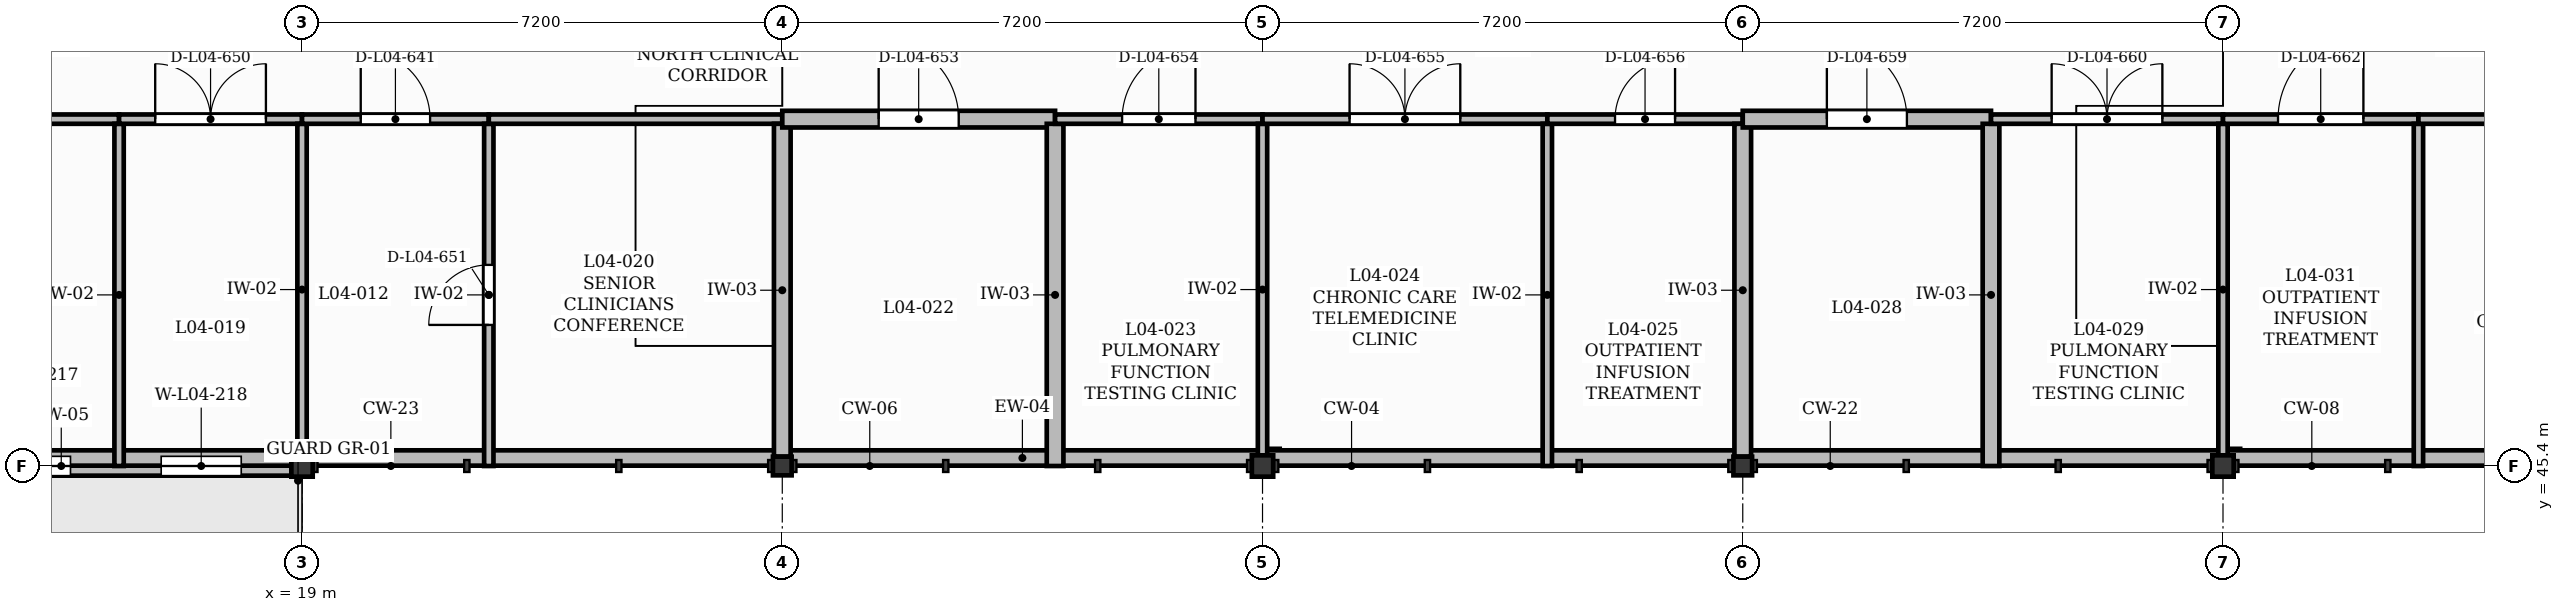
"""IFC4 building model, lengths in metres.
Left out: names, types, materials, properties, quantities, classifications, styles, units other than length and angle.
Written with IfcOpenShell. Run it as: python <this file> out.ifc"""

import sys

from ifc_helpers import new_model, si_unit, direction, frame, frame_2d, origin, origin_2d, place, context, subcontext, project, spatial, polyline, rectangle, outline, extrude, element, fill, save


model = new_model("IFC4")
c1 = context("Model", 3, precision=1e-05, world=origin(), true_north=direction((0.0, 1.0)))
c2 = subcontext(c1, "Body", "Model", "MODEL_VIEW")
j1 = project(units=[si_unit("LENGTHUNIT", "METRE"), si_unit("PLANEANGLEUNIT", "RADIAN")], contexts=[c1])
p1 = place(None, origin())
s1 = spatial("IfcSite", under=j1, at=p1, CompositionType="ELEMENT")
p2 = place(p1, origin())
s2 = spatial("IfcBuilding", under=s1, at=p2, CompositionType="ELEMENT")
p3 = place(p2, frame((0.0, 0.0, 17.4)))
s3 = spatial("IfcBuildingStorey", under=s2, at=p3, CompositionType="ELEMENT", Elevation=17.4)
p4 = place(p3, frame((19.0, 45.4, 0.0), z_axis=(0.0, 0.0, 1.0), x_axis=(1.0, 0.0, 0.0)))
e1 = element("IfcColumn", 1, at=p4, inside=s3, PredefinedType="COLUMN", context=c2, shape_type="SweptSolid", body=[
    extrude(rectangle(XDim=0.32, YDim=0.32, at=origin_2d()), origin(), (0.0, 0.0, 1.0), 3.95),
])
p5 = place(p3, frame((26.2, 45.4, 0.0), z_axis=(0.0, 0.0, 1.0), x_axis=(1.0, 0.0, 0.0)))
e2 = element("IfcColumn", 2, at=p5, inside=s3, PredefinedType="COLUMN", context=c2, shape_type="SweptSolid", body=[
    extrude(rectangle(XDim=0.28, YDim=0.28, at=origin_2d()), origin(), (0.0, 0.0, 1.0), 3.95),
])
p6 = place(p3, frame((33.4, 45.4, 0.0), z_axis=(0.0, 0.0, 1.0), x_axis=(1.0, 0.0, 0.0)))
e3 = element("IfcColumn", 3, at=p6, inside=s3, PredefinedType="COLUMN", context=c2, shape_type="SweptSolid", body=[
    extrude(rectangle(XDim=0.32, YDim=0.32, at=origin_2d()), origin(), (0.0, 0.0, 1.0), 3.95),
])
p7 = place(p3, frame((40.6, 45.4, 0.0), z_axis=(0.0, 0.0, 1.0), x_axis=(1.0, 0.0, 0.0)))
e4 = element("IfcColumn", 4, at=p7, inside=s3, PredefinedType="COLUMN", context=c2, shape_type="SweptSolid", body=[
    extrude(rectangle(XDim=0.28, YDim=0.28, at=origin_2d()), origin(), (0.0, 0.0, 1.0), 3.95),
])
p8 = place(p3, frame((47.8, 45.4, 0.0), z_axis=(0.0, 0.0, 1.0), x_axis=(1.0, 0.0, 0.0)))
e5 = element("IfcColumn", 5, at=p8, inside=s3, PredefinedType="COLUMN", context=c2, shape_type="SweptSolid", body=[
    extrude(rectangle(XDim=0.32, YDim=0.32, at=origin_2d()), origin(), (0.0, 0.0, 1.0), 3.95),
])
p9 = place(p3, frame((11.94, 45.4, 0.0), z_axis=(0.0, 0.0, 1.0), x_axis=(1.0, 0.0, 0.0)))
e6 = element("IfcWall", 6, at=p9, inside=s3, PredefinedType="SOLIDWALL", context=c2, shape_type="SweptSolid", body=[
    extrude(rectangle(XDim=6.9, YDim=0.29, at=frame_2d((3.45, 0.0))), origin(), (0.0, 0.0, 1.0), 3.49),
])
p10 = place(p9, frame((0.55, 0.0, 0.0)))
e7 = element("IfcOpeningElement", 7, at=p10, cuts=e6, PredefinedType="OPENING", context=c2, shape_type="SweptSolid", body=[
    extrude(rectangle(XDim=1.1, YDim=2.25, at=frame_2d((0.55, 1.125))), frame((0.0, 0.155, 0.0), z_axis=(0.0, -1.0, 0.0), x_axis=(1.0, 0.0, 0.0)), (0.0, 0.0, 1.0), 0.31),
])
p11 = place(p9, frame((2.438, 0.0, 1.5)))
e8 = element("IfcOpeningElement", 8, at=p11, cuts=e6, PredefinedType="OPENING", context=c2, shape_type="SweptSolid", body=[
    extrude(rectangle(XDim=1.15, YDim=1.25, at=frame_2d((0.575, 0.625))), frame((0.0, 0.155, 0.0), z_axis=(0.0, -1.0, 0.0), x_axis=(1.0, 0.0, 0.0)), (0.0, 0.0, 1.0), 0.31),
])
p12 = place(p9, frame((4.948, 0.0, 1.0)))
e9 = element("IfcOpeningElement", 9, at=p12, cuts=e6, PredefinedType="OPENING", context=c2, shape_type="SweptSolid", body=[
    extrude(rectangle(XDim=1.2, YDim=1.95, at=frame_2d((0.6, 0.975))), frame((0.0, 0.155, 0.0), z_axis=(0.0, -1.0, 0.0), x_axis=(1.0, 0.0, 0.0)), (0.0, 0.0, 1.0), 0.31),
])
p13 = place(p3, frame((4.6, 45.52, 4.2), z_axis=(0.0, 0.0, 1.0), x_axis=(1.0, 0.0, 0.0)))
e10 = element("IfcWall", 10, at=p13, inside=s3, PredefinedType="PARAPET", context=c2, shape_type="SweptSolid", body=[
    extrude(outline(polyline([(0.0, 0.0), (50.4, 0.0), (50.4, 0.6), (39.312, 0.85), (39.312, 0.6), (32.256, 1.1), (32.256, 0.85), (18.144, 1.1), (18.144, 0.85), (11.088, 0.85), (11.088, 0.6), (0.0, 0.6), (0.0, 0.0)])), frame((0.0, 0.115, 0.0), z_axis=(0.0, -1.0, 0.0), x_axis=(1.0, 0.0, 0.0)), (0.0, 0.0, 1.0), 0.23),
])
p14 = place(p3, frame((11.8, 50.6, 0.0), z_axis=(0.0, 0.0, 1.0), x_axis=(1.0, 0.0, 0.0)))
e11 = element("IfcWall", 11, at=p14, inside=s3, PredefinedType="PARTITIONING", context=c2, shape_type="SweptSolid", body=[
    extrude(rectangle(XDim=4.457, YDim=0.14, at=frame_2d((2.229, 0.0))), origin(), (0.0, 0.0, 1.0), 3.93),
])
p15 = place(p14, frame((1.678, 0.0, 0.0)))
e12 = element("IfcOpeningElement", 12, at=p15, cuts=e11, PredefinedType="OPENING", context=c2, shape_type="SweptSolid", body=[
    extrude(rectangle(XDim=1.1, YDim=2.1, at=frame_2d((0.55, 1.05))), frame((0.0, 0.08, 0.0), z_axis=(0.0, -1.0, 0.0), x_axis=(1.0, 0.0, 0.0)), (0.0, 0.0, 1.0), 0.16),
])
p16 = place(p3, frame((16.257, 45.4, 0.0), z_axis=(0.0, 0.0, 1.0), x_axis=(0.0, 1.0, 0.0)))
e13 = element("IfcWall", 13, at=p16, inside=s3, PredefinedType="PARTITIONING", context=c2, shape_type="SweptSolid", body=[
    extrude(rectangle(XDim=5.13, YDim=0.14, at=frame_2d((2.565, 0.0))), origin(), (0.0, 0.0, 1.0), 3.93),
])
p17 = place(p3, frame((16.257, 50.6, 0.0), z_axis=(0.0, 0.0, 1.0), x_axis=(1.0, 0.0, 0.0)))
e14 = element("IfcWall", 14, at=p17, inside=s3, PredefinedType="PARTITIONING", context=c2, shape_type="SweptSolid", body=[
    extrude(rectangle(XDim=2.743, YDim=0.14, at=frame_2d((1.372, 0.0))), origin(), (0.0, 0.0, 1.0), 3.93),
])
p18 = place(p17, frame((0.542, 0.0, 0.0)))
e15 = element("IfcOpeningElement", 15, at=p18, cuts=e14, PredefinedType="OPENING", context=c2, shape_type="SweptSolid", body=[
    extrude(rectangle(XDim=1.66, YDim=2.3, at=frame_2d((0.83, 1.15))), frame((0.0, 0.08, 0.0), z_axis=(0.0, -1.0, 0.0), x_axis=(1.0, 0.0, 0.0)), (0.0, 0.0, 1.0), 0.16),
])
p19 = place(p3, frame((19.0, 45.56, 0.0), z_axis=(0.0, 0.0, 1.0), x_axis=(0.0, 1.0, 0.0)))
e16 = element("IfcWall", 16, at=p19, inside=s3, PredefinedType="PARTITIONING", context=c2, shape_type="SweptSolid", body=[
    extrude(rectangle(XDim=4.97, YDim=0.14, at=frame_2d((2.485, 0.0))), origin(), (0.0, 0.0, 1.0), 3.49),
])
p20 = place(p3, frame((19.0, 50.6, 0.0), z_axis=(0.0, 0.0, 1.0), x_axis=(1.0, 0.0, 0.0)))
e17 = element("IfcWall", 17, at=p20, inside=s3, PredefinedType="PARTITIONING", context=c2, shape_type="SweptSolid", body=[
    extrude(rectangle(XDim=2.8, YDim=0.14, at=frame_2d((1.4, 0.0))), origin(), (0.0, 0.0, 1.0), 3.93),
])
p21 = place(p20, frame((0.88, 0.0, 0.0)))
e18 = element("IfcOpeningElement", 18, at=p21, cuts=e17, PredefinedType="OPENING", context=c2, shape_type="SweptSolid", body=[
    extrude(rectangle(XDim=1.04, YDim=2.1, at=frame_2d((0.52, 1.05))), frame((0.0, 0.08, 0.0), z_axis=(0.0, -1.0, 0.0), x_axis=(1.0, 0.0, 0.0)), (0.0, 0.0, 1.0), 0.16),
])
p22 = place(p3, frame((21.8, 45.4, 0.0), z_axis=(0.0, 0.0, 1.0), x_axis=(0.0, 1.0, 0.0)))
e19 = element("IfcWall", 19, at=p22, inside=s3, PredefinedType="PARTITIONING", context=c2, shape_type="SweptSolid", body=[
    extrude(rectangle(XDim=5.13, YDim=0.14, at=frame_2d((2.565, 0.0))), origin(), (0.0, 0.0, 1.0), 3.93),
])
p23 = place(p22, frame((2.115, 0.0, 0.0)))
e20 = element("IfcOpeningElement", 20, at=p23, cuts=e19, PredefinedType="OPENING", context=c2, shape_type="SweptSolid", body=[
    extrude(rectangle(XDim=0.9, YDim=2.1, at=frame_2d((0.45, 1.05))), frame((0.0, 0.08, 0.0), z_axis=(0.0, -1.0, 0.0), x_axis=(1.0, 0.0, 0.0)), (0.0, 0.0, 1.0), 0.16),
])
p24 = place(p3, frame((21.8, 50.6, 0.0), z_axis=(0.0, 0.0, 1.0), x_axis=(1.0, 0.0, 0.0)))
e21 = element("IfcWall", 21, at=p24, inside=s3, PredefinedType="PARTITIONING", context=c2, shape_type="SweptSolid", body=[
    extrude(rectangle(XDim=4.4, YDim=0.14, at=frame_2d((2.2, 0.0))), origin(), (0.0, 0.0, 1.0), 3.93),
])
p25 = place(p3, frame((26.2, 45.54, 0.0), z_axis=(0.0, 0.0, 1.0), x_axis=(0.0, 1.0, 0.0)))
e22 = element("IfcWall", 22, at=p25, inside=s3, PredefinedType="SOLIDWALL", context=c2, shape_type="SweptSolid", body=[
    extrude(rectangle(XDim=4.99, YDim=0.25, at=frame_2d((2.495, 0.0))), origin(), (0.0, 0.0, 1.0), 3.49),
])
p26 = place(p3, frame((26.2, 50.6, 0.0), z_axis=(0.0, 0.0, 1.0), x_axis=(1.0, 0.0, 0.0)))
e23 = element("IfcWall", 23, at=p26, inside=s3, PredefinedType="SOLIDWALL", context=c2, shape_type="SweptSolid", body=[
    extrude(rectangle(XDim=4.09, YDim=0.25, at=frame_2d((2.045, 0.0))), origin(), (0.0, 0.0, 1.0), 3.93),
])
p27 = place(p26, frame((1.445, 0.0, 0.0)))
e24 = element("IfcOpeningElement", 24, at=p27, cuts=e23, PredefinedType="OPENING", context=c2, shape_type="SweptSolid", body=[
    extrude(rectangle(XDim=1.2, YDim=2.15, at=frame_2d((0.6, 1.075))), frame((0.0, 0.135, 0.0), z_axis=(0.0, -1.0, 0.0), x_axis=(1.0, 0.0, 0.0)), (0.0, 0.0, 1.0), 0.27),
])
p28 = place(p3, frame((30.29, 45.4, 0.0), z_axis=(0.0, 0.0, 1.0), x_axis=(0.0, 1.0, 0.0)))
e25 = element("IfcWall", 25, at=p28, inside=s3, PredefinedType="SOLIDWALL", context=c2, shape_type="SweptSolid", body=[
    extrude(rectangle(XDim=5.13, YDim=0.25, at=frame_2d((2.565, 0.0))), origin(), (0.0, 0.0, 1.0), 3.93),
])
p29 = place(p3, frame((30.29, 50.6, 0.0), z_axis=(0.0, 0.0, 1.0), x_axis=(1.0, 0.0, 0.0)))
e26 = element("IfcWall", 26, at=p29, inside=s3, PredefinedType="PARTITIONING", context=c2, shape_type="SweptSolid", body=[
    extrude(rectangle(XDim=3.11, YDim=0.14, at=frame_2d((1.555, 0.0))), origin(), (0.0, 0.0, 1.0), 3.93),
])
p30 = place(p29, frame((1.005, 0.0, 0.0)))
e27 = element("IfcOpeningElement", 27, at=p30, cuts=e26, PredefinedType="OPENING", context=c2, shape_type="SweptSolid", body=[
    extrude(rectangle(XDim=1.1, YDim=2.1, at=frame_2d((0.55, 1.05))), frame((0.0, 0.08, 0.0), z_axis=(0.0, -1.0, 0.0), x_axis=(1.0, 0.0, 0.0)), (0.0, 0.0, 1.0), 0.16),
])
p31 = place(p3, frame((33.4, 45.56, 0.0), z_axis=(0.0, 0.0, 1.0), x_axis=(0.0, 1.0, 0.0)))
e28 = element("IfcWall", 28, at=p31, inside=s3, PredefinedType="PARTITIONING", context=c2, shape_type="SweptSolid", body=[
    extrude(rectangle(XDim=4.97, YDim=0.14, at=frame_2d((2.485, 0.0))), origin(), (0.0, 0.0, 1.0), 3.49),
])
p32 = place(p3, frame((33.4, 50.6, 0.0), z_axis=(0.0, 0.0, 1.0), x_axis=(1.0, 0.0, 0.0)))
e29 = element("IfcWall", 29, at=p32, inside=s3, PredefinedType="PARTITIONING", context=c2, shape_type="SweptSolid", body=[
    extrude(rectangle(XDim=4.27, YDim=0.14, at=frame_2d((2.135, 0.0))), origin(), (0.0, 0.0, 1.0), 3.93),
])
p33 = place(p32, frame((1.305, 0.0, 0.0)))
e30 = element("IfcOpeningElement", 30, at=p33, cuts=e29, PredefinedType="OPENING", context=c2, shape_type="SweptSolid", body=[
    extrude(rectangle(XDim=1.66, YDim=2.3, at=frame_2d((0.83, 1.15))), frame((0.0, 0.08, 0.0), z_axis=(0.0, -1.0, 0.0), x_axis=(1.0, 0.0, 0.0)), (0.0, 0.0, 1.0), 0.16),
])
p34 = place(p3, frame((37.67, 45.4, 0.0), z_axis=(0.0, 0.0, 1.0), x_axis=(0.0, 1.0, 0.0)))
e31 = element("IfcWall", 31, at=p34, inside=s3, PredefinedType="PARTITIONING", context=c2, shape_type="SweptSolid", body=[
    extrude(rectangle(XDim=5.13, YDim=0.14, at=frame_2d((2.565, 0.0))), origin(), (0.0, 0.0, 1.0), 3.93),
])
p35 = place(p3, frame((37.67, 50.6, 0.0), z_axis=(0.0, 0.0, 1.0), x_axis=(1.0, 0.0, 0.0)))
e32 = element("IfcWall", 32, at=p35, inside=s3, PredefinedType="PARTITIONING", context=c2, shape_type="SweptSolid", body=[
    extrude(rectangle(XDim=2.93, YDim=0.14, at=frame_2d((1.465, 0.0))), origin(), (0.0, 0.0, 1.0), 3.93),
])
p36 = place(p35, frame((1.015, 0.0, 0.0)))
e33 = element("IfcOpeningElement", 33, at=p36, cuts=e32, PredefinedType="OPENING", context=c2, shape_type="SweptSolid", body=[
    extrude(rectangle(XDim=0.9, YDim=2.1, at=frame_2d((0.45, 1.05))), frame((0.0, 0.08, 0.0), z_axis=(0.0, -1.0, 0.0), x_axis=(1.0, 0.0, 0.0)), (0.0, 0.0, 1.0), 0.16),
])
p37 = place(p3, frame((40.6, 45.54, 0.0), z_axis=(0.0, 0.0, 1.0), x_axis=(0.0, 1.0, 0.0)))
e34 = element("IfcWall", 34, at=p37, inside=s3, PredefinedType="SOLIDWALL", context=c2, shape_type="SweptSolid", body=[
    extrude(rectangle(XDim=4.99, YDim=0.25, at=frame_2d((2.495, 0.0))), origin(), (0.0, 0.0, 1.0), 3.49),
])
p38 = place(p3, frame((40.6, 50.6, 0.0), z_axis=(0.0, 0.0, 1.0), x_axis=(1.0, 0.0, 0.0)))
e35 = element("IfcWall", 35, at=p38, inside=s3, PredefinedType="SOLIDWALL", context=c2, shape_type="SweptSolid", body=[
    extrude(rectangle(XDim=3.722, YDim=0.25, at=frame_2d((1.861, 0.0))), origin(), (0.0, 0.0, 1.0), 3.93),
])
p39 = place(p38, frame((1.261, 0.0, 0.0)))
e36 = element("IfcOpeningElement", 36, at=p39, cuts=e35, PredefinedType="OPENING", context=c2, shape_type="SweptSolid", body=[
    extrude(rectangle(XDim=1.2, YDim=2.15, at=frame_2d((0.6, 1.075))), frame((0.0, 0.135, 0.0), z_axis=(0.0, -1.0, 0.0), x_axis=(1.0, 0.0, 0.0)), (0.0, 0.0, 1.0), 0.27),
])
p40 = place(p3, frame((44.322, 45.4, 0.0), z_axis=(0.0, 0.0, 1.0), x_axis=(0.0, 1.0, 0.0)))
e37 = element("IfcWall", 37, at=p40, inside=s3, PredefinedType="SOLIDWALL", context=c2, shape_type="SweptSolid", body=[
    extrude(rectangle(XDim=5.13, YDim=0.25, at=frame_2d((2.565, 0.0))), origin(), (0.0, 0.0, 1.0), 3.93),
])
p41 = place(p3, frame((44.322, 50.6, 0.0), z_axis=(0.0, 0.0, 1.0), x_axis=(1.0, 0.0, 0.0)))
e38 = element("IfcWall", 38, at=p41, inside=s3, PredefinedType="PARTITIONING", context=c2, shape_type="SweptSolid", body=[
    extrude(rectangle(XDim=3.478, YDim=0.14, at=frame_2d((1.739, 0.0))), origin(), (0.0, 0.0, 1.0), 3.93),
])
p42 = place(p41, frame((0.909, 0.0, 0.0)))
e39 = element("IfcOpeningElement", 39, at=p42, cuts=e38, PredefinedType="OPENING", context=c2, shape_type="SweptSolid", body=[
    extrude(rectangle(XDim=1.66, YDim=2.3, at=frame_2d((0.83, 1.15))), frame((0.0, 0.08, 0.0), z_axis=(0.0, -1.0, 0.0), x_axis=(1.0, 0.0, 0.0)), (0.0, 0.0, 1.0), 0.16),
])
p43 = place(p3, frame((47.8, 45.56, 0.0), z_axis=(0.0, 0.0, 1.0), x_axis=(0.0, 1.0, 0.0)))
e40 = element("IfcWall", 40, at=p43, inside=s3, PredefinedType="PARTITIONING", context=c2, shape_type="SweptSolid", body=[
    extrude(rectangle(XDim=4.97, YDim=0.14, at=frame_2d((2.485, 0.0))), origin(), (0.0, 0.0, 1.0), 3.49),
])
p44 = place(p3, frame((47.8, 50.6, 0.0), z_axis=(0.0, 0.0, 1.0), x_axis=(1.0, 0.0, 0.0)))
e41 = element("IfcWall", 41, at=p44, inside=s3, PredefinedType="PARTITIONING", context=c2, shape_type="SweptSolid", body=[
    extrude(rectangle(XDim=2.93, YDim=0.14, at=frame_2d((1.465, 0.0))), origin(), (0.0, 0.0, 1.0), 3.93),
])
p45 = place(p44, frame((0.825, 0.0, 0.0)))
e42 = element("IfcOpeningElement", 42, at=p45, cuts=e41, PredefinedType="OPENING", context=c2, shape_type="SweptSolid", body=[
    extrude(rectangle(XDim=1.28, YDim=2.2, at=frame_2d((0.64, 1.1))), frame((0.0, 0.08, 0.0), z_axis=(0.0, -1.0, 0.0), x_axis=(1.0, 0.0, 0.0)), (0.0, 0.0, 1.0), 0.16),
])
p46 = place(p3, frame((50.73, 45.4, 0.0), z_axis=(0.0, 0.0, 1.0), x_axis=(0.0, 1.0, 0.0)))
e43 = element("IfcWall", 43, at=p46, inside=s3, PredefinedType="PARTITIONING", context=c2, shape_type="SweptSolid", body=[
    extrude(rectangle(XDim=5.13, YDim=0.14, at=frame_2d((2.565, 0.0))), origin(), (0.0, 0.0, 1.0), 3.93),
])
p47 = place(p3, frame((50.73, 50.6, 0.0), z_axis=(0.0, 0.0, 1.0), x_axis=(1.0, 0.0, 0.0)))
e44 = element("IfcWall", 44, at=p47, inside=s3, PredefinedType="PARTITIONING", context=c2, shape_type="SweptSolid", body=[
    extrude(rectangle(XDim=4.27, YDim=0.14, at=frame_2d((2.135, 0.0))), origin(), (0.0, 0.0, 1.0), 3.93),
])
p48 = place(p47, frame((1.685, 0.0, 0.0)))
e45 = element("IfcOpeningElement", 45, at=p48, cuts=e44, PredefinedType="OPENING", context=c2, shape_type="SweptSolid", body=[
    extrude(rectangle(XDim=0.9, YDim=2.1, at=frame_2d((0.45, 1.05))), frame((0.0, 0.08, 0.0), z_axis=(0.0, -1.0, 0.0), x_axis=(1.0, 0.0, 0.0)), (0.0, 0.0, 1.0), 0.16),
])
p49 = place(p11, origin())
e46 = element("IfcWindow", 46, at=p49, inside=s3, PartitioningType="SINGLE_PANEL", PredefinedType="WINDOW", context=c2, shape_type="SweptSolid", body=[
    extrude(rectangle(XDim=1.15, YDim=1.25, at=frame_2d((0.575, 0.625))), frame((0.0, 0.03, 0.0), z_axis=(0.0, -1.0, 0.0), x_axis=(1.0, 0.0, 0.0)), (0.0, 0.0, 1.0), 0.06),
])
fill(e8, e46)
p50 = place(p12, origin())
e47 = element("IfcWindow", 47, at=p50, inside=s3, PartitioningType="SINGLE_PANEL", PredefinedType="WINDOW", context=c2, shape_type="SweptSolid", body=[
    extrude(rectangle(XDim=1.2, YDim=1.95, at=frame_2d((0.6, 0.975))), frame((0.0, 0.03, 0.0), z_axis=(0.0, -1.0, 0.0), x_axis=(1.0, 0.0, 0.0)), (0.0, 0.0, 1.0), 0.06),
])
fill(e9, e47)
p51 = place(p21, origin())
e48 = element("IfcDoor", 48, at=p51, inside=s3, OperationType="SINGLE_SWING_LEFT", PredefinedType="DOOR", context=c2, shape_type="SweptSolid", body=[
    extrude(rectangle(XDim=1.04, YDim=2.1, at=frame_2d((0.52, 1.05))), frame((0.0, 0.025, 0.0), z_axis=(0.0, -1.0, 0.0), x_axis=(1.0, 0.0, 0.0)), (0.0, 0.0, 1.0), 0.05),
])
fill(e18, e48)
p52 = place(p18, origin())
e49 = element("IfcDoor", 49, at=p52, inside=s3, OperationType="DOUBLE_DOOR_SINGLE_SWING", PredefinedType="DOOR", context=c2, shape_type="SweptSolid", body=[
    extrude(rectangle(XDim=1.66, YDim=2.3, at=frame_2d((0.83, 1.15))), frame((0.0, 0.025, 0.0), z_axis=(0.0, -1.0, 0.0), x_axis=(1.0, 0.0, 0.0)), (0.0, 0.0, 1.0), 0.05),
])
fill(e15, e49)
p53 = place(p23, origin())
e50 = element("IfcDoor", 50, at=p53, inside=s3, OperationType="SINGLE_SWING_LEFT", PredefinedType="DOOR", context=c2, shape_type="SweptSolid", body=[
    extrude(rectangle(XDim=0.9, YDim=2.1, at=frame_2d((0.45, 1.05))), frame((0.0, 0.025, 0.0), z_axis=(0.0, -1.0, 0.0), x_axis=(1.0, 0.0, 0.0)), (0.0, 0.0, 1.0), 0.05),
])
fill(e20, e50)
p54 = place(p27, origin())
e51 = element("IfcDoor", 51, at=p54, inside=s3, OperationType="SINGLE_SWING_LEFT", PredefinedType="DOOR", context=c2, shape_type="SweptSolid", body=[
    extrude(rectangle(XDim=1.2, YDim=2.15, at=frame_2d((0.6, 1.075))), frame((0.0, 0.025, 0.0), z_axis=(0.0, -1.0, 0.0), x_axis=(1.0, 0.0, 0.0)), (0.0, 0.0, 1.0), 0.05),
])
fill(e24, e51)
p55 = place(p30, origin())
e52 = element("IfcDoor", 52, at=p55, inside=s3, OperationType="SINGLE_SWING_RIGHT", PredefinedType="DOOR", context=c2, shape_type="SweptSolid", body=[
    extrude(rectangle(XDim=1.1, YDim=2.1, at=frame_2d((0.55, 1.05))), frame((0.0, 0.025, 0.0), z_axis=(0.0, -1.0, 0.0), x_axis=(1.0, 0.0, 0.0)), (0.0, 0.0, 1.0), 0.05),
])
fill(e27, e52)
p56 = place(p33, origin())
e53 = element("IfcDoor", 53, at=p56, inside=s3, OperationType="DOUBLE_DOOR_SINGLE_SWING", PredefinedType="DOOR", context=c2, shape_type="SweptSolid", body=[
    extrude(rectangle(XDim=1.66, YDim=2.3, at=frame_2d((0.83, 1.15))), frame((0.0, 0.025, 0.0), z_axis=(0.0, -1.0, 0.0), x_axis=(1.0, 0.0, 0.0)), (0.0, 0.0, 1.0), 0.05),
])
fill(e30, e53)
p57 = place(p36, origin())
e54 = element("IfcDoor", 54, at=p57, inside=s3, OperationType="SINGLE_SWING_RIGHT", PredefinedType="DOOR", context=c2, shape_type="SweptSolid", body=[
    extrude(rectangle(XDim=0.9, YDim=2.1, at=frame_2d((0.45, 1.05))), frame((0.0, 0.025, 0.0), z_axis=(0.0, -1.0, 0.0), x_axis=(1.0, 0.0, 0.0)), (0.0, 0.0, 1.0), 0.05),
])
fill(e33, e54)
p58 = place(p39, origin())
e55 = element("IfcDoor", 55, at=p58, inside=s3, OperationType="SINGLE_SWING_LEFT", PredefinedType="DOOR", context=c2, shape_type="SweptSolid", body=[
    extrude(rectangle(XDim=1.2, YDim=2.15, at=frame_2d((0.6, 1.075))), frame((0.0, 0.025, 0.0), z_axis=(0.0, -1.0, 0.0), x_axis=(1.0, 0.0, 0.0)), (0.0, 0.0, 1.0), 0.05),
])
fill(e36, e55)
p59 = place(p42, origin())
e56 = element("IfcDoor", 56, at=p59, inside=s3, OperationType="DOUBLE_DOOR_SINGLE_SWING", PredefinedType="DOOR", context=c2, shape_type="SweptSolid", body=[
    extrude(rectangle(XDim=1.66, YDim=2.3, at=frame_2d((0.83, 1.15))), frame((0.0, 0.025, 0.0), z_axis=(0.0, -1.0, 0.0), x_axis=(1.0, 0.0, 0.0)), (0.0, 0.0, 1.0), 0.05),
])
fill(e39, e56)
p60 = place(p45, origin())
e57 = element("IfcDoor", 57, at=p60, inside=s3, OperationType="SINGLE_SWING_RIGHT", PredefinedType="DOOR", context=c2, shape_type="SweptSolid", body=[
    extrude(rectangle(XDim=1.28, YDim=2.2, at=frame_2d((0.64, 1.1))), frame((0.0, 0.025, 0.0), z_axis=(0.0, -1.0, 0.0), x_axis=(1.0, 0.0, 0.0)), (0.0, 0.0, 1.0), 0.05),
])
fill(e42, e57)
save(model, sys.argv[1])
